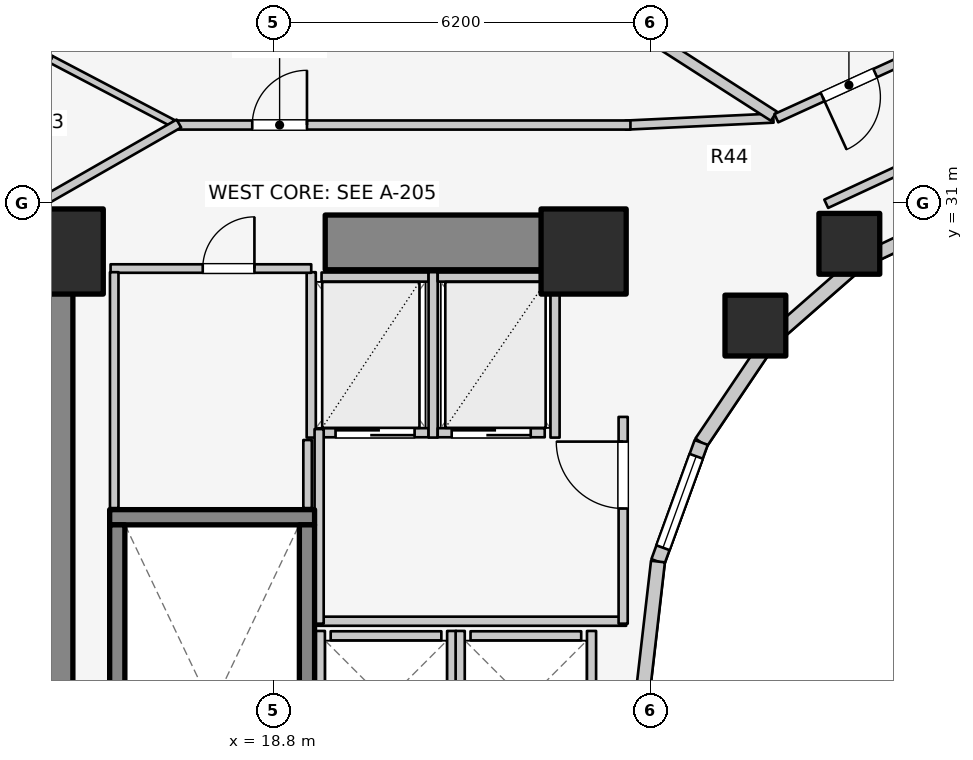
"""IFC4 building model, lengths in metres.
Left out: names, types, materials, properties, quantities, classifications, styles, units other than length and angle.
Written with IfcOpenShell. Run it as: python <this file> out.ifc"""

import sys

from ifc_helpers import new_model, si_unit, direction, frame, frame_2d, origin, origin_2d, place, context, subcontext, project, spatial, rectangle, extrude, element, fill, save


model = new_model("IFC4")
c1 = context("Model", 3, precision=1e-05, world=origin(), true_north=direction((0.0, 1.0)))
c2 = subcontext(c1, "Body", "Model", "MODEL_VIEW")
j1 = project(units=[si_unit("LENGTHUNIT", "METRE"), si_unit("PLANEANGLEUNIT", "RADIAN")], contexts=[c1])
p1 = place(None, origin())
s1 = spatial("IfcSite", under=j1, at=p1, CompositionType="ELEMENT")
p2 = place(p1, origin())
s2 = spatial("IfcBuilding", under=s1, at=p2, CompositionType="ELEMENT")
p3 = place(p2, frame((0.0, 0.0, 55.5)))
s3 = spatial("IfcBuildingStorey", under=s2, at=p3, CompositionType="ELEMENT", Elevation=55.5)
p4 = place(p3, frame((15.05, 17.05, 0.0), z_axis=(0.0, 0.0, 1.0), x_axis=(0.0, 1.0, 0.0)))
e1 = element("IfcWall", 1, at=p4, inside=s3, PredefinedType="SHEAR", context=c2, shape_type="SweptSolid", body=[
    extrude(rectangle(XDim=12.8, YDim=0.9, at=frame_2d((6.4, 0.0))), origin(), (0.0, 0.0, 1.0), 3.1),
])
p5 = place(p3, frame((19.65, 30.35, 0.0), z_axis=(0.0, 0.0, 1.0), x_axis=(1.0, 0.0, 0.0)))
e2 = element("IfcWall", 2, at=p5, inside=s3, PredefinedType="SHEAR", context=c2, shape_type="SweptSolid", body=[
    extrude(rectangle(XDim=4.5, YDim=0.9, at=frame_2d((2.25, 0.0))), origin(), (0.0, 0.0, 1.0), 3.1),
])
p6 = place(p3, frame((16.105, 25.83, 0.0), z_axis=(0.0, 0.0, 1.0), x_axis=(1.0, 0.0, 0.0)))
e3 = element("IfcWall", 3, at=p6, inside=s3, PredefinedType="SOLIDWALL", context=c2, shape_type="SweptSolid", body=[
    extrude(rectangle(XDim=3.37, YDim=0.25, at=frame_2d((1.685, 0.0))), origin(), (0.0, 0.0, 1.0), 3.1),
])
for number, where, z_axis, x_axis in (
    (4, (16.23, 17.895, 0.0), (0.0, 0.0, 1.0), (0.0, 1.0, 0.0)),
    (5, (19.35, 17.895, 0.0), (0.0, 0.0, 1.0), (0.0, 1.0, 0.0)),
):
    element("IfcWall", number, at=place(p3, frame(where, z_axis=z_axis, x_axis=x_axis)), inside=s3, PredefinedType="SOLIDWALL", context=c2, shape_type="SweptSolid", body=[
        extrude(rectangle(XDim=7.81, YDim=0.25, at=frame_2d((3.905, 0.0))), origin(), (0.0, 0.0, 1.0), 3.1),
    ])
for number, where, z_axis, x_axis in (
    (6, (23.9, 30.2, 0.0), (0.0, 0.0, 1.0), (1.0, 0.0, 0.0)),
    (7, (15.3, 30.2, 0.0), (0.0, 0.0, 1.0), (1.0, 0.0, 0.0)),
):
    element("IfcColumn", number, at=place(p3, frame(where, z_axis=z_axis, x_axis=x_axis)), inside=s3, PredefinedType="COLUMN", context=c2, shape_type="SweptSolid", body=[
        extrude(rectangle(XDim=1.4, YDim=1.4, at=origin_2d()), origin(), (0.0, 0.0, 1.0), 3.1),
    ])
for number, where, z_axis, x_axis in (
    (8, (28.27, 30.327, 0.0), (0.0, 0.0, 1.0), (1.0, 0.0, 0.0)),
    (9, (26.725, 28.982, 0.0), (0.0, 0.0, 1.0), (1.0, 0.0, 0.0)),
):
    element("IfcColumn", number, at=place(p3, frame(where, z_axis=z_axis, x_axis=x_axis)), inside=s3, PredefinedType="COLUMN", context=c2, shape_type="SweptSolid", body=[
        extrude(rectangle(XDim=1.0, YDim=1.0, at=origin_2d()), origin(), (0.0, 0.0, 1.0), 3.1),
    ])
p7 = place(p3, frame((30.157, 30.843, 0.0), z_axis=(0.0, 0.0, 1.0), x_axis=(-0.904179699603, -0.427152280606, 0.0)))
e10 = element("IfcWall", 10, at=p7, inside=s3, PredefinedType="STANDARD", context=c2, shape_type="SweptSolid", body=[
    extrude(rectangle(XDim=1.899, YDim=0.23, at=frame_2d((0.95, 0.0))), origin(), (0.0, 0.0, 1.0), 2.16),
])
p8 = place(p3, frame((28.44, 30.032, 0.0), z_axis=(0.0, 0.0, 1.0), x_axis=(-0.752576694707, -0.658504607869, 0.0)))
e11 = element("IfcWall", 11, at=p8, inside=s3, PredefinedType="STANDARD", context=c2, shape_type="SweptSolid", body=[
    extrude(rectangle(XDim=1.959, YDim=0.23, at=frame_2d((0.98, 0.0))), origin(), (0.0, 0.0, 1.0), 2.16),
])
p9 = place(p3, frame((26.965, 28.742, 0.0), z_axis=(0.0, 0.0, 1.0), x_axis=(-0.558197800898, -0.829707909492, 0.0)))
e12 = element("IfcWall", 12, at=p9, inside=s3, PredefinedType="STANDARD", context=c2, shape_type="SweptSolid", body=[
    extrude(rectangle(XDim=2.027, YDim=0.23, at=frame_2d((1.013, 0.0))), origin(), (0.0, 0.0, 1.0), 2.16),
])
p10 = place(p3, frame((25.834, 27.06, 0.0), z_axis=(0.0, 0.0, 1.0), x_axis=(-0.341423187295, -0.93990968033, 0.0)))
e13 = element("IfcWall", 13, at=p10, inside=s3, PredefinedType="STANDARD", context=c2, shape_type="SweptSolid", body=[
    extrude(rectangle(XDim=2.084, YDim=0.23, at=frame_2d((1.042, 0.0))), origin(), (0.0, 0.0, 1.0), 2.84),
])
p11 = place(p10, frame((0.242, 0.0, 0.85)))
e14 = element("IfcOpeningElement", 14, at=p11, cuts=e13, PredefinedType="OPENING", context=c2, shape_type="SweptSolid", body=[
    extrude(rectangle(XDim=1.6, YDim=1.65, at=frame_2d((0.8, 0.825))), frame((0.0, 0.125, 0.0), z_axis=(0.0, -1.0, 0.0), x_axis=(1.0, 0.0, 0.0)), (0.0, 0.0, 1.0), 0.25),
])
p12 = place(p3, frame((25.123, 25.102, 0.0), z_axis=(0.0, 0.0, 1.0), x_axis=(-0.114711713601, -0.993398823617, 0.0)))
e15 = element("IfcWall", 15, at=p12, inside=s3, PredefinedType="STANDARD", context=c2, shape_type="SweptSolid", body=[
    extrude(rectangle(XDim=2.115, YDim=0.23, at=frame_2d((1.058, 0.0))), origin(), (0.0, 0.0, 1.0), 2.84),
])
p13 = place(p3, frame((19.74, 23.88, 0.0), z_axis=(0.0, 0.0, 1.0), x_axis=(1.0, 0.0, 0.0)))
e16 = element("IfcWall", 16, at=p13, inside=s3, PredefinedType="SOLIDWALL", context=c2, shape_type="SweptSolid", body=[
    extrude(rectangle(XDim=1.82, YDim=0.15, at=frame_2d((0.91, 0.0))), origin(), (0.0, 0.0, 1.0), 2.855),
])
for number, where, z_axis, x_axis in (
    (17, (19.57, 21.64, 0.0), (0.0, 0.0, 1.0), (0.0, 1.0, 0.0)),
    (18, (21.73, 21.64, 0.0), (0.0, 0.0, 1.0), (0.0, 1.0, 0.0)),
):
    element("IfcWall", number, at=place(p3, frame(where, z_axis=z_axis, x_axis=x_axis)), inside=s3, PredefinedType="SOLIDWALL", context=c2, shape_type="SweptSolid", body=[
        extrude(rectangle(XDim=2.32, YDim=0.15, at=frame_2d((1.16, 0.0))), origin(), (0.0, 0.0, 1.0), 2.855),
    ])
p14 = place(p3, frame((22.04, 23.88, 0.0), z_axis=(0.0, 0.0, 1.0), x_axis=(1.0, 0.0, 0.0)))
e19 = element("IfcWall", 19, at=p14, inside=s3, PredefinedType="SOLIDWALL", context=c2, shape_type="SweptSolid", body=[
    extrude(rectangle(XDim=1.82, YDim=0.15, at=frame_2d((0.91, 0.0))), origin(), (0.0, 0.0, 1.0), 2.12),
])
p15 = place(p3, frame((21.87, 21.64, 0.0), z_axis=(0.0, 0.0, 1.0), x_axis=(0.0, 1.0, 0.0)))
e20 = element("IfcWall", 20, at=p15, inside=s3, PredefinedType="SOLIDWALL", context=c2, shape_type="SweptSolid", body=[
    extrude(rectangle(XDim=2.32, YDim=0.15, at=frame_2d((1.16, 0.0))), origin(), (0.0, 0.0, 1.0), 2.855),
])
p16 = place(p3, frame((24.03, 21.64, 0.0), z_axis=(0.0, 0.0, 1.0), x_axis=(0.0, 1.0, 0.0)))
e21 = element("IfcWall", 21, at=p16, inside=s3, PredefinedType="SOLIDWALL", context=c2, shape_type="SweptSolid", body=[
    extrude(rectangle(XDim=2.32, YDim=0.15, at=frame_2d((1.16, 0.0))), origin(), (0.0, 0.0, 1.0), 2.12),
])
p17 = place(p3, frame((19.59, 27.22, 0.0), z_axis=(0.0, 0.0, 1.0), x_axis=(1.0, 0.0, 0.0)))
e22 = element("IfcWall", 22, at=p17, inside=s3, PredefinedType="SOLIDWALL", context=c2, shape_type="SweptSolid", body=[
    extrude(rectangle(XDim=1.76, YDim=0.15, at=frame_2d((0.88, 0.0))), origin(), (0.0, 0.0, 1.0), 2.855),
])
p18 = place(p17, frame((0.23, 0.0, 0.0)))
e23 = element("IfcOpeningElement", 23, at=p18, cuts=e22, PredefinedType="OPENING", context=c2, shape_type="SweptSolid", body=[
    extrude(rectangle(XDim=1.3, YDim=2.1, at=frame_2d((0.65, 1.05))), frame((0.0, 0.085, 0.0), z_axis=(0.0, -1.0, 0.0), x_axis=(1.0, 0.0, 0.0)), (0.0, 0.0, 1.0), 0.17),
])
p19 = place(p3, frame((19.59, 29.78, 0.0), z_axis=(0.0, 0.0, 1.0), x_axis=(1.0, 0.0, 0.0)))
e24 = element("IfcWall", 24, at=p19, inside=s3, PredefinedType="SOLIDWALL", context=c2, shape_type="SweptSolid", body=[
    extrude(rectangle(XDim=1.76, YDim=0.15, at=frame_2d((0.88, 0.0))), origin(), (0.0, 0.0, 1.0), 2.855),
])
for number, where, z_axis, x_axis in (
    (25, (19.42, 27.14, 0.0), (0.0, 0.0, 1.0), (0.0, 1.0, 0.0)),
    (26, (21.425, 27.14, 0.0), (0.0, 0.0, 1.0), (0.0, 1.0, 0.0)),
):
    element("IfcWall", number, at=place(p3, frame(where, z_axis=z_axis, x_axis=x_axis)), inside=s3, PredefinedType="SOLIDWALL", context=c2, shape_type="SweptSolid", body=[
        extrude(rectangle(XDim=2.72, YDim=0.15, at=frame_2d((1.36, 0.0))), origin(), (0.0, 0.0, 1.0), 2.855),
    ])
p20 = place(p3, frame((21.5, 27.22, 0.0), z_axis=(0.0, 0.0, 1.0), x_axis=(1.0, 0.0, 0.0)))
e27 = element("IfcWall", 27, at=p20, inside=s3, PredefinedType="SOLIDWALL", context=c2, shape_type="SweptSolid", body=[
    extrude(rectangle(XDim=1.76, YDim=0.15, at=frame_2d((0.88, 0.0))), origin(), (0.0, 0.0, 1.0), 2.855),
])
p21 = place(p20, frame((0.23, 0.0, 0.0)))
e28 = element("IfcOpeningElement", 28, at=p21, cuts=e27, PredefinedType="OPENING", context=c2, shape_type="SweptSolid", body=[
    extrude(rectangle(XDim=1.3, YDim=2.1, at=frame_2d((0.65, 1.05))), frame((0.0, 0.085, 0.0), z_axis=(0.0, -1.0, 0.0), x_axis=(1.0, 0.0, 0.0)), (0.0, 0.0, 1.0), 0.17),
])
p22 = place(p3, frame((21.5, 29.78, 0.0), z_axis=(0.0, 0.0, 1.0), x_axis=(1.0, 0.0, 0.0)))
e29 = element("IfcWall", 29, at=p22, inside=s3, PredefinedType="SOLIDWALL", context=c2, shape_type="SweptSolid", body=[
    extrude(rectangle(XDim=1.76, YDim=0.15, at=frame_2d((0.88, 0.0))), origin(), (0.0, 0.0, 1.0), 2.855),
])
p23 = place(p3, frame((23.43, 27.14, 0.0), z_axis=(0.0, 0.0, 1.0), x_axis=(0.0, 1.0, 0.0)))
e30 = element("IfcWall", 30, at=p23, inside=s3, PredefinedType="SOLIDWALL", context=c2, shape_type="SweptSolid", body=[
    extrude(rectangle(XDim=2.72, YDim=0.15, at=frame_2d((1.36, 0.0))), origin(), (0.0, 0.0, 1.0), 2.855),
])
p24 = place(p3, frame((19.52, 24.12, 0.0), z_axis=(0.0, 0.0, 1.0), x_axis=(1.0, 0.0, 0.0)))
e31 = element("IfcWall", 31, at=p24, inside=s3, PredefinedType="PARTITIONING", context=c2, shape_type="SweptSolid", body=[
    extrude(rectangle(XDim=5.08, YDim=0.15, at=frame_2d((2.54, 0.0))), origin(), (0.0, 0.0, 1.0), 2.12),
])
p25 = place(p3, frame((19.55, 24.08, 0.0), z_axis=(0.0, 0.0, 1.0), x_axis=(0.0, 1.0, 0.0)))
e32 = element("IfcWall", 32, at=p25, inside=s3, PredefinedType="PARTITIONING", context=c2, shape_type="SweptSolid", body=[
    extrude(rectangle(XDim=3.2, YDim=0.15, at=frame_2d((1.6, 0.0))), origin(), (0.0, 0.0, 1.0), 2.855),
])
p26 = place(p3, frame((24.55, 24.08, 0.0), z_axis=(0.0, 0.0, 1.0), x_axis=(0.0, 1.0, 0.0)))
e33 = element("IfcWall", 33, at=p26, inside=s3, PredefinedType="PARTITIONING", context=c2, shape_type="SweptSolid", body=[
    extrude(rectangle(XDim=3.4, YDim=0.15, at=frame_2d((1.7, 0.0))), origin(), (0.0, 0.0, 1.0), 2.855),
])
p27 = place(p26, frame((1.894, 0.0, 0.0)))
e34 = element("IfcOpeningElement", 34, at=p27, cuts=e33, PredefinedType="OPENING", context=c2, shape_type="SweptSolid", body=[
    extrude(rectangle(XDim=1.1, YDim=2.1, at=frame_2d((0.55, 1.05))), frame((0.0, 0.085, 0.0), z_axis=(0.0, -1.0, 0.0), x_axis=(1.0, 0.0, 0.0)), (0.0, 0.0, 1.0), 0.17),
])
p28 = place(p3, frame((16.12, 29.92, 0.0), z_axis=(0.0, 0.0, 1.0), x_axis=(1.0, 0.0, 0.0)))
e35 = element("IfcWall", 35, at=p28, inside=s3, PredefinedType="PLUMBINGWALL", context=c2, shape_type="SweptSolid", body=[
    extrude(rectangle(XDim=3.3, YDim=0.14, at=frame_2d((1.65, 0.0))), origin(), (0.0, 0.0, 1.0), 2.855),
])
p29 = place(p28, frame((1.516, 0.0, 0.0)))
e36 = element("IfcOpeningElement", 36, at=p29, cuts=e35, PredefinedType="OPENING", context=c2, shape_type="SweptSolid", body=[
    extrude(rectangle(XDim=0.85, YDim=2.05, at=frame_2d((0.425, 1.025))), frame((0.0, 0.08, 0.0), z_axis=(0.0, -1.0, 0.0), x_axis=(1.0, 0.0, 0.0)), (0.0, 0.0, 1.0), 0.16),
])
p30 = place(p3, frame((16.18, 25.98, 0.0), z_axis=(0.0, 0.0, 1.0), x_axis=(0.0, 1.0, 0.0)))
e37 = element("IfcWall", 37, at=p30, inside=s3, PredefinedType="PLUMBINGWALL", context=c2, shape_type="SweptSolid", body=[
    extrude(rectangle(XDim=3.88, YDim=0.14, at=frame_2d((1.94, 0.0))), origin(), (0.0, 0.0, 1.0), 2.855),
])
p31 = place(p3, frame((19.36, 25.98, 0.0), z_axis=(0.0, 0.0, 1.0), x_axis=(0.0, 1.0, 0.0)))
e38 = element("IfcWall", 38, at=p31, inside=s3, PredefinedType="PLUMBINGWALL", context=c2, shape_type="SweptSolid", body=[
    extrude(rectangle(XDim=1.12, YDim=0.14, at=frame_2d((0.56, 0.0))), origin(), (0.0, 0.0, 1.0), 2.855),
])
p32 = place(p3, frame((29.873, 31.906, 0.0), z_axis=(0.0, 0.0, 1.0), x_axis=(-0.906943449489, -0.421252393975, 0.0)))
e39 = element("IfcWall", 39, at=p32, inside=s3, PredefinedType="PARTITIONING", context=c2, shape_type="SweptSolid", body=[
    extrude(rectangle(XDim=2.186, YDim=0.15, at=frame_2d((1.093, 0.0))), origin(), (0.0, 0.0, 1.0), 2.237),
])
p33 = place(p3, frame((17.244, 32.257, 0.0), z_axis=(0.0, 0.0, 1.0), x_axis=(-0.885586030676, 0.464475383924, 0.0)))
e40 = element("IfcWall", 40, at=p33, inside=s3, PredefinedType="MOVABLE", context=c2, shape_type="SweptSolid", body=[
    extrude(rectangle(XDim=2.376, YDim=0.12, at=frame_2d((1.188, 0.0))), origin(), (0.0, 0.0, 1.0), 2.855),
])
p34 = place(p3, frame((15.14, 33.36, 0.0), z_axis=(0.0, 0.0, 1.0), x_axis=(-0.885447282698, 0.464739829972, 0.0)))
e41 = element("IfcWall", 41, at=p34, inside=s3, PredefinedType="MOVABLE", context=c2, shape_type="SweptSolid", body=[
    extrude(rectangle(XDim=1.17, YDim=0.12, at=frame_2d((0.585, 0.0))), origin(), (0.0, 0.0, 1.0), 2.11),
])
p35 = place(p34, frame((0.16, 0.0, 0.0)))
e42 = element("IfcOpeningElement", 42, at=p35, cuts=e41, PredefinedType="OPENING", context=c2, shape_type="SweptSolid", body=[
    extrude(rectangle(XDim=0.85, YDim=2.05, at=frame_2d((0.425, 1.025))), frame((0.0, 0.07, 0.0), z_axis=(0.0, -1.0, 0.0), x_axis=(1.0, 0.0, 0.0)), (0.0, 0.0, 1.0), 0.14),
])
p36 = place(p3, frame((27.02, 32.394, 0.0), z_axis=(0.0, 0.0, 1.0), x_axis=(-0.998877427952, -0.047369651964, 0.0)))
e43 = element("IfcWall", 43, at=p36, inside=s3, PredefinedType="PARTITIONING", context=c2, shape_type="SweptSolid", body=[
    extrude(rectangle(XDim=2.433, YDim=0.15, at=frame_2d((1.216, 0.0))), origin(), (0.0, 0.0, 1.0), 2.237),
])
p37 = place(p3, frame((17.15, 32.28, 0.0), z_axis=(0.0, 0.0, 1.0), x_axis=(1.0, 0.0, 0.0)))
e44 = element("IfcWall", 44, at=p37, inside=s3, PredefinedType="PARTITIONING", context=c2, shape_type="SweptSolid", body=[
    extrude(rectangle(XDim=7.52, YDim=0.15, at=frame_2d((3.76, 0.0))), origin(), (0.0, 0.0, 1.0), 2.237),
])
p38 = place(p37, frame((1.3, 0.0, 0.0)))
e45 = element("IfcOpeningElement", 45, at=p38, cuts=e44, PredefinedType="OPENING", context=c2, shape_type="SweptSolid", body=[
    extrude(rectangle(XDim=0.9, YDim=2.1, at=frame_2d((0.45, 1.05))), frame((0.0, 0.085, 0.0), z_axis=(0.0, -1.0, 0.0), x_axis=(1.0, 0.0, 0.0)), (0.0, 0.0, 1.0), 0.17),
])
p39 = place(p3, frame((17.243, 32.305, 0.0), z_axis=(0.0, 0.0, 1.0), x_axis=(-0.867991349648, -0.496579315857, 0.0)))
e46 = element("IfcWall", 46, at=p39, inside=s3, PredefinedType="PARTITIONING", context=c2, shape_type="SweptSolid", body=[
    extrude(rectangle(XDim=2.567, YDim=0.15, at=frame_2d((1.283, 0.0))), origin(), (0.0, 0.0, 1.0), 2.069),
])
p40 = place(p3, frame((27.029, 32.426, 0.0), z_axis=(0.0, 0.0, 1.0), x_axis=(-0.841689919529, 0.5399611832, 0.0)))
e47 = element("IfcWall", 47, at=p40, inside=s3, PredefinedType="PARTITIONING", context=c2, shape_type="SweptSolid", body=[
    extrude(rectangle(XDim=10.058, YDim=0.18, at=frame_2d((5.029, 0.0))), origin(), (0.0, 0.0, 1.0), 2.237),
])
p41 = place(p3, frame((29.484, 33.443, 0.0), z_axis=(0.0, 0.0, 1.0), x_axis=(-0.675445566455, 0.737409849918, 0.0)))
e48 = element("IfcWall", 48, at=p41, inside=s3, PredefinedType="PLUMBINGWALL", context=c2, shape_type="SweptSolid", body=[
    extrude(rectangle(XDim=2.1, YDim=0.14, at=frame_2d((1.05, 0.0))), origin(), (0.0, 0.0, 1.0), 2.855),
])
p42 = place(p3, frame((29.457, 33.482, 0.0), z_axis=(0.0, 0.0, 1.0), x_axis=(-0.909747571199, -0.415161843982, 0.0)))
e49 = element("IfcWall", 49, at=p42, inside=s3, PredefinedType="PARTITIONING", context=c2, shape_type="SweptSolid", body=[
    extrude(rectangle(XDim=2.625, YDim=0.15, at=frame_2d((1.312, 0.0))), origin(), (0.0, 0.0, 1.0), 2.237),
])
p43 = place(p42, frame((0.838, 0.0, 0.0)))
e50 = element("IfcOpeningElement", 50, at=p43, cuts=e49, PredefinedType="OPENING", context=c2, shape_type="SweptSolid", body=[
    extrude(rectangle(XDim=0.95, YDim=2.1, at=frame_2d((0.475, 1.05))), frame((0.0, 0.085, 0.0), z_axis=(0.0, -1.0, 0.0), x_axis=(1.0, 0.0, 0.0)), (0.0, 0.0, 1.0), 0.17),
])
p44 = place(p11, origin())
e51 = element("IfcWindow", 51, at=p44, inside=s3, PartitioningType="SINGLE_PANEL", PredefinedType="WINDOW", context=c2, shape_type="SweptSolid", body=[
    extrude(rectangle(XDim=1.6, YDim=1.65, at=frame_2d((0.8, 0.825))), frame((0.0, 0.03, 0.0), z_axis=(0.0, -1.0, 0.0), x_axis=(1.0, 0.0, 0.0)), (0.0, 0.0, 1.0), 0.06),
])
fill(e14, e51)
p45 = place(p18, origin())
e52 = element("IfcDoor", 52, at=p45, inside=s3, OperationType="DOUBLE_DOOR_SLIDING", PredefinedType="DOOR", context=c2, shape_type="SweptSolid", body=[
    extrude(rectangle(XDim=1.3, YDim=2.1, at=frame_2d((0.65, 1.05))), frame((0.0, 0.025, 0.0), z_axis=(0.0, -1.0, 0.0), x_axis=(1.0, 0.0, 0.0)), (0.0, 0.0, 1.0), 0.05),
])
fill(e23, e52)
p46 = place(p21, origin())
e53 = element("IfcDoor", 53, at=p46, inside=s3, OperationType="DOUBLE_DOOR_SLIDING", PredefinedType="DOOR", context=c2, shape_type="SweptSolid", body=[
    extrude(rectangle(XDim=1.3, YDim=2.1, at=frame_2d((0.65, 1.05))), frame((0.0, 0.025, 0.0), z_axis=(0.0, -1.0, 0.0), x_axis=(1.0, 0.0, 0.0)), (0.0, 0.0, 1.0), 0.05),
])
fill(e28, e53)
p47 = place(p27, origin())
e54 = element("IfcDoor", 54, at=p47, inside=s3, OperationType="SINGLE_SWING_RIGHT", PredefinedType="DOOR", context=c2, shape_type="SweptSolid", body=[
    extrude(rectangle(XDim=1.1, YDim=2.1, at=frame_2d((0.55, 1.05))), frame((0.0, 0.025, 0.0), z_axis=(0.0, -1.0, 0.0), x_axis=(1.0, 0.0, 0.0)), (0.0, 0.0, 1.0), 0.05),
])
fill(e34, e54)
p48 = place(p29, origin())
e55 = element("IfcDoor", 55, at=p48, inside=s3, OperationType="SINGLE_SWING_RIGHT", PredefinedType="DOOR", context=c2, shape_type="SweptSolid", body=[
    extrude(rectangle(XDim=0.85, YDim=2.05, at=frame_2d((0.425, 1.025))), frame((0.0, 0.025, 0.0), z_axis=(0.0, -1.0, 0.0), x_axis=(1.0, 0.0, 0.0)), (0.0, 0.0, 1.0), 0.05),
])
fill(e36, e55)
p49 = place(p38, origin())
e56 = element("IfcDoor", 56, at=p49, inside=s3, OperationType="SINGLE_SWING_RIGHT", PredefinedType="DOOR", context=c2, shape_type="SweptSolid", body=[
    extrude(rectangle(XDim=0.9, YDim=2.1, at=frame_2d((0.45, 1.05))), frame((0.0, 0.025, 0.0), z_axis=(0.0, -1.0, 0.0), x_axis=(1.0, 0.0, 0.0)), (0.0, 0.0, 1.0), 0.05),
])
fill(e45, e56)
p50 = place(p43, origin())
e57 = element("IfcDoor", 57, at=p50, inside=s3, OperationType="SINGLE_SWING_RIGHT", PredefinedType="DOOR", context=c2, shape_type="SweptSolid", body=[
    extrude(rectangle(XDim=0.95, YDim=2.1, at=frame_2d((0.475, 1.05))), frame((0.0, 0.025, 0.0), z_axis=(0.0, -1.0, 0.0), x_axis=(1.0, 0.0, 0.0)), (0.0, 0.0, 1.0), 0.05),
])
fill(e50, e57)
save(model, sys.argv[1])
